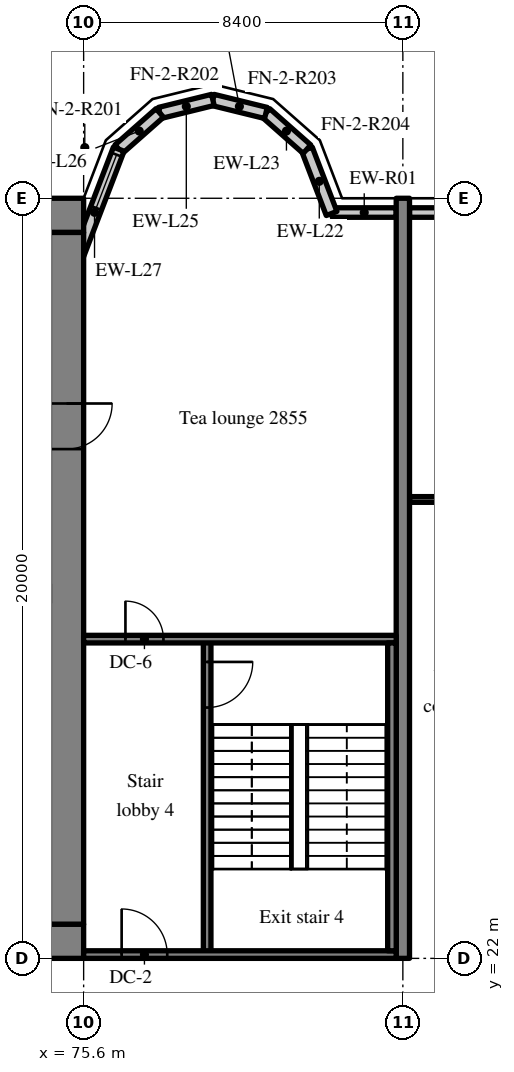
"""IFC4 building model, lengths in metres.
Left out: names, types, materials, properties, quantities, classifications, styles, units other than length and angle.
Written with IfcOpenShell. Run it as: python <this file> out.ifc"""

import sys

from ifc_helpers import new_model, si_unit, direction, frame, frame_2d, origin, place, context, subcontext, project, spatial, rectangle, extrude, source, transform, mapped, element, fill, save


model = new_model("IFC4")
c1 = context("Model", 3, precision=1e-05, world=origin(), true_north=direction((0.0, 1.0)))
c2 = subcontext(c1, "Body", "Model", "MODEL_VIEW")
j1 = project(units=[si_unit("LENGTHUNIT", "METRE"), si_unit("PLANEANGLEUNIT", "RADIAN")], contexts=[c1])
p1 = place(None, origin())
s1 = spatial("IfcSite", under=j1, at=p1, CompositionType="ELEMENT")
p2 = place(p1, origin())
s2 = spatial("IfcBuilding", under=s1, at=p2, CompositionType="ELEMENT")
p3 = place(p2, frame((0.0, 0.0, 118.0)))
s3 = spatial("IfcBuildingStorey", under=s2, at=p3, CompositionType="ELEMENT", Elevation=118.0)
m1 = source(origin(), c2, "Body", "SweptSolid", [
    extrude(rectangle(XDim=50.4, YDim=0.9, at=frame_2d((25.2, 0.0))), origin(), (0.0, 0.0, 1.0), 3.52),
])
p4 = place(p3, frame((25.2, 22.45, 0.0), z_axis=(0.0, 0.0, 1.0), x_axis=(1.0, 0.0, 0.0)))
e1 = element("IfcWall", 1, at=p4, inside=s3, PredefinedType="SHEAR", context=c2, shape_type="MappedRepresentation", body=[
    mapped(m1, transform((0.0, 0.0, 0.0), scale=1.0)),
])
m2 = source(origin(), c2, "Body", "SweptSolid", [
    extrude(rectangle(XDim=1.8, YDim=2.1, at=frame_2d((0.9, 1.05))), frame((0.0, 0.46, 0.0), z_axis=(0.0, -1.0, 0.0), x_axis=(1.0, 0.0, 0.0)), (0.0, 0.0, 1.0), 0.92),
])
p5 = place(p4, frame((15.9, 0.0, 0.0)))
e2 = element("IfcOpeningElement", 2, at=p5, cuts=e1, PredefinedType="OPENING", context=c2, shape_type="MappedRepresentation", body=[
    mapped(m2, transform((0.0, 0.0, 0.0), scale=1.0)),
])
m3 = source(origin(), c2, "Body", "SweptSolid", [
    extrude(rectangle(XDim=1.2, YDim=2.1, at=frame_2d((0.6, 1.05))), frame((0.0, 0.46, 0.0), z_axis=(0.0, -1.0, 0.0), x_axis=(1.0, 0.0, 0.0)), (0.0, 0.0, 1.0), 0.92),
])
p6 = place(p4, frame((26.975, 0.0, 0.0)))
e3 = element("IfcOpeningElement", 3, at=p6, cuts=e1, PredefinedType="OPENING", context=c2, shape_type="MappedRepresentation", body=[
    mapped(m3, transform((0.0, 0.0, 0.0), scale=1.0)),
])
m4 = source(origin(), c2, "Body", "SweptSolid", [
    extrude(rectangle(XDim=0.9, YDim=2.1, at=frame_2d((0.45, 1.05))), frame((0.0, 0.46, 0.0), z_axis=(0.0, -1.0, 0.0), x_axis=(1.0, 0.0, 0.0)), (0.0, 0.0, 1.0), 0.92),
])
p7 = place(p4, frame((33.75, 0.0, 0.0)))
e4 = element("IfcOpeningElement", 4, at=p7, cuts=e1, PredefinedType="OPENING", context=c2, shape_type="MappedRepresentation", body=[
    mapped(m4, transform((0.0, 0.0, 0.0), scale=1.0)),
])
p8 = place(p4, frame((30.75, 0.0, 0.0)))
e5 = element("IfcOpeningElement", 5, at=p8, cuts=e1, PredefinedType="OPENING", context=c2, shape_type="MappedRepresentation", body=[
    mapped(m4, transform((0.0, 0.0, 0.0), scale=1.0)),
])
p9 = place(p4, frame((39.788, 0.0, 0.0)))
e6 = element("IfcOpeningElement", 6, at=p9, cuts=e1, PredefinedType="OPENING", context=c2, shape_type="MappedRepresentation", body=[
    mapped(m4, transform((0.0, 0.0, 0.0), scale=1.0)),
])
p10 = place(p4, frame((36.762, 0.0, 0.0)))
e7 = element("IfcOpeningElement", 7, at=p10, cuts=e1, PredefinedType="OPENING", context=c2, shape_type="MappedRepresentation", body=[
    mapped(m4, transform((0.0, 0.0, 0.0), scale=1.0)),
])
p11 = place(p4, frame((6.45, 0.0, 0.0)))
e8 = element("IfcOpeningElement", 8, at=p11, cuts=e1, PredefinedType="OPENING", context=c2, shape_type="MappedRepresentation", body=[
    mapped(m3, transform((0.0, 0.0, 0.0), scale=1.0)),
])
p12 = place(p4, frame((47.775, 0.0, 0.0)))
e9 = element("IfcOpeningElement", 9, at=p12, cuts=e1, PredefinedType="OPENING", context=c2, shape_type="MappedRepresentation", body=[
    mapped(m3, transform((0.0, 0.0, 0.0), scale=1.0)),
])
p13 = place(p3, frame((25.2, 41.55, 0.0), z_axis=(0.0, 0.0, 1.0), x_axis=(1.0, 0.0, 0.0)))
e10 = element("IfcWall", 10, at=p13, inside=s3, PredefinedType="SHEAR", context=c2, shape_type="MappedRepresentation", body=[
    mapped(m1, transform((0.0, 0.0, 0.0), scale=1.0)),
])
m5 = source(origin(), c2, "Body", "SweptSolid", [
    extrude(rectangle(XDim=18.2, YDim=0.9, at=frame_2d((9.1, 0.0))), origin(), (0.0, 0.0, 1.0), 3.52),
])
p14 = place(p3, frame((75.15, 22.9, 0.0), z_axis=(0.0, 0.0, 1.0), x_axis=(0.0, 1.0, 0.0)))
e11 = element("IfcWall", 11, at=p14, inside=s3, PredefinedType="SHEAR", context=c2, shape_type="MappedRepresentation", body=[
    mapped(m5, transform((0.0, 0.0, 0.0), scale=1.0)),
])
p15 = place(p14, frame((12.5, 0.0, 0.0)))
e12 = element("IfcOpeningElement", 12, at=p15, cuts=e11, PredefinedType="OPENING", context=c2, shape_type="MappedRepresentation", body=[
    mapped(m3, transform((0.0, 0.0, 0.0), scale=1.0)),
])
m6 = source(origin(), c2, "Body", "SweptSolid", [
    extrude(rectangle(XDim=20.0, YDim=0.35, at=frame_2d((10.0, 0.0))), origin(), (0.0, 0.0, 1.0), 3.52),
])
p16 = place(p3, frame((84.0, 22.0, 0.0), z_axis=(0.0, 0.0, 1.0), x_axis=(0.0, 1.0, 0.0)))
e13 = element("IfcWall", 13, at=p16, inside=s3, PredefinedType="SHEAR", context=c2, shape_type="MappedRepresentation", body=[
    mapped(m6, transform((0.0, 0.0, 0.0), scale=1.0)),
])
m7 = source(origin(), c2, "Body", "SweptSolid", [
    extrude(rectangle(XDim=1.683, YDim=0.25, at=frame_2d((0.841, 0.0))), origin(), (0.0, 0.0, 1.0), 2.82),
])
p17 = place(p3, frame((83.825, 41.625, 0.0), z_axis=(0.0, 0.0, 1.0), x_axis=(-1.0, 0.0, 0.0)))
e14 = element("IfcWall", 14, at=p17, inside=s3, PredefinedType="SOLIDWALL", context=c2, shape_type="MappedRepresentation", body=[
    mapped(m7, transform((0.0, 0.0, 0.0), scale=1.0)),
])
m8 = source(origin(), c2, "Body", "SweptSolid", [
    extrude(rectangle(XDim=3.675, YDim=0.25, at=frame_2d((1.837, 0.0))), origin(), (0.0, 0.0, 1.0), 2.82),
])
p18 = place(p3, frame((87.85, 41.625, 0.0), z_axis=(0.0, 0.0, 1.0), x_axis=(-1.0, 0.0, 0.0)))
e15 = element("IfcWall", 15, at=p18, inside=s3, PredefinedType="SOLIDWALL", context=c2, shape_type="MappedRepresentation", body=[
    mapped(m8, transform((0.0, 0.0, 0.0), scale=1.0)),
])
m9 = source(origin(), c2, "Body", "SweptSolid", [
    extrude(rectangle(XDim=1.5, YDim=1.5, at=frame_2d((0.75, 0.75))), frame((0.0, 0.135, 0.0), z_axis=(0.0, -1.0, 0.0), x_axis=(1.0, 0.0, 0.0)), (0.0, 0.0, 1.0), 0.27),
])
p19 = place(p18, frame((1.087, 0.0, 0.9)))
e16 = element("IfcOpeningElement", 16, at=p19, cuts=e15, PredefinedType="OPENING", context=c2, shape_type="MappedRepresentation", body=[
    mapped(m9, transform((0.0, 0.0, 0.0), scale=1.0)),
])
m10 = source(origin(), c2, "Body", "SweptSolid", [
    extrude(rectangle(XDim=1.812, YDim=0.3, at=frame_2d((0.906, 0.0))), origin(), (0.0, 0.0, 1.0), 3.52),
])
p20 = place(p3, frame((82.125, 41.6, 0.0), z_axis=(0.0, 0.0, 1.0), x_axis=(-0.357877270961, 0.93376863244, 0.0)))
e17 = element("IfcWall", 17, at=p20, inside=s3, PredefinedType="SOLIDWALL", context=c2, shape_type="MappedRepresentation", body=[
    mapped(m10, transform((0.0, 0.0, 0.0), scale=1.0)),
])
m11 = source(origin(), c2, "Body", "SweptSolid", [
    extrude(rectangle(XDim=1.44, YDim=0.3, at=frame_2d((0.72, 0.0))), origin(), (0.0, 0.0, 1.0), 3.52),
])
p21 = place(p3, frame((81.477, 43.292, 0.0), z_axis=(0.0, 0.0, 1.0), x_axis=(-0.74957555648, 0.661918790432, 0.0)))
e18 = element("IfcWall", 18, at=p21, inside=s3, PredefinedType="SOLIDWALL", context=c2, shape_type="MappedRepresentation", body=[
    mapped(m11, transform((0.0, 0.0, 0.0), scale=1.0)),
])
m12 = source(origin(), c2, "Body", "SweptSolid", [
    extrude(rectangle(XDim=1.439, YDim=0.3, at=frame_2d((0.719, 0.0))), origin(), (0.0, 0.0, 1.0), 3.52),
])
for number, where, z_axis, x_axis in (
    (19, (80.397, 44.245, 0.0), (0.0, 0.0, 1.0), (-0.971, 0.238, 0.0)),
    (20, (79.0, 44.588, 0.0), (0.0, 0.0, 1.0), (-0.971, -0.238, 0.0)),
):
    element("IfcWall", number, at=place(p3, frame(where, z_axis=z_axis, x_axis=x_axis)), inside=s3, PredefinedType="SOLIDWALL", context=c2, shape_type="MappedRepresentation", body=[
        mapped(m12, transform((0.0, 0.0, 0.0), scale=1.0)),
    ])
p22 = place(p3, frame((77.603, 44.245, 0.0), z_axis=(0.0, 0.0, 1.0), x_axis=(-0.74957555648, -0.661918790432, 0.0)))
e21 = element("IfcWall", 21, at=p22, inside=s3, PredefinedType="SOLIDWALL", context=c2, shape_type="MappedRepresentation", body=[
    mapped(m11, transform((0.0, 0.0, 0.0), scale=1.0)),
])
m13 = source(origin(), c2, "Body", "SweptSolid", [
    extrude(rectangle(XDim=3.559, YDim=0.3, at=frame_2d((1.78, 0.0))), origin(), (0.0, 0.0, 1.0), 3.52),
])
p23 = place(p3, frame((76.523, 43.292, 0.0), z_axis=(0.0, 0.0, 1.0), x_axis=(-0.35779745313, -0.933799219604, 0.0)))
e22 = element("IfcWall", 22, at=p23, inside=s3, PredefinedType="SOLIDWALL", context=c2, shape_type="MappedRepresentation", body=[
    mapped(m13, transform((0.0, 0.0, 0.0), scale=1.0)),
])
m14 = source(origin(), c2, "Body", "SweptSolid", [
    extrude(rectangle(XDim=1.5, YDim=2.0, at=frame_2d((0.75, 1.0))), frame((0.0, 0.16, 0.0), z_axis=(0.0, -1.0, 0.0), x_axis=(1.0, 0.0, 0.0)), (0.0, 0.0, 1.0), 0.32),
])
p24 = place(p23, frame((0.156, 0.0, 0.9)))
e23 = element("IfcOpeningElement", 23, at=p24, cuts=e22, PredefinedType="OPENING", context=c2, shape_type="MappedRepresentation", body=[
    mapped(m14, transform((0.0, 0.0, 0.0), scale=1.0)),
])
m15 = source(origin(), c2, "Body", "SweptSolid", [
    extrude(rectangle(XDim=8.3, YDim=0.2, at=frame_2d((4.15, 0.0))), origin(), (0.0, 0.0, 1.0), 3.52),
])
p25 = place(p3, frame((78.85, 22.1, 0.0), z_axis=(0.0, 0.0, 1.0), x_axis=(0.0, 1.0, 0.0)))
e24 = element("IfcWall", 24, at=p25, inside=s3, PredefinedType="SOLIDWALL", context=c2, shape_type="MappedRepresentation", body=[
    mapped(m15, transform((0.0, 0.0, 0.0), scale=1.0)),
])
m16 = source(origin(), c2, "Body", "SweptSolid", [
    extrude(rectangle(XDim=1.2, YDim=2.1, at=frame_2d((0.6, 1.05))), frame((0.0, 0.11, 0.0), z_axis=(0.0, -1.0, 0.0), x_axis=(1.0, 0.0, 0.0)), (0.0, 0.0, 1.0), 0.22),
])
p26 = place(p25, frame((6.5, 0.0, 0.0)))
e25 = element("IfcOpeningElement", 25, at=p26, cuts=e24, PredefinedType="OPENING", context=c2, shape_type="MappedRepresentation", body=[
    mapped(m16, transform((0.0, 0.0, 0.0), scale=1.0)),
])
m17 = source(origin(), c2, "Body", "SweptSolid", [
    extrude(rectangle(XDim=8.225, YDim=0.2, at=frame_2d((4.112, 0.0))), origin(), (0.0, 0.0, 1.0), 3.52),
])
p27 = place(p3, frame((83.825, 22.1, 0.0), z_axis=(0.0, 0.0, 1.0), x_axis=(-1.0, 0.0, 0.0)))
e26 = element("IfcWall", 26, at=p27, inside=s3, PredefinedType="SOLIDWALL", context=c2, shape_type="MappedRepresentation", body=[
    mapped(m17, transform((0.0, 0.0, 0.0), scale=1.0)),
])
p28 = place(p27, frame((6.025, 0.0, 0.0)))
e27 = element("IfcOpeningElement", 27, at=p28, cuts=e26, PredefinedType="OPENING", context=c2, shape_type="MappedRepresentation", body=[
    mapped(m16, transform((0.0, 0.0, 0.0), scale=1.0)),
])
p29 = place(p3, frame((83.825, 30.4, 0.0), z_axis=(0.0, 0.0, 1.0), x_axis=(-1.0, 0.0, 0.0)))
e28 = element("IfcWall", 28, at=p29, inside=s3, PredefinedType="SOLIDWALL", context=c2, shape_type="MappedRepresentation", body=[
    mapped(m17, transform((0.0, 0.0, 0.0), scale=1.0)),
])
m18 = source(origin(), c2, "Body", "SweptSolid", [
    extrude(rectangle(XDim=1.0, YDim=2.1, at=frame_2d((0.5, 1.05))), frame((0.0, 0.11, 0.0), z_axis=(0.0, -1.0, 0.0), x_axis=(1.0, 0.0, 0.0)), (0.0, 0.0, 1.0), 0.22),
])
p30 = place(p29, frame((6.125, 0.0, 0.0)))
e29 = element("IfcOpeningElement", 29, at=p30, cuts=e28, PredefinedType="OPENING", context=c2, shape_type="MappedRepresentation", body=[
    mapped(m18, transform((0.0, 0.0, 0.0), scale=1.0)),
])
m19 = source(origin(), c2, "Body", "SweptSolid", [
    extrude(rectangle(XDim=8.1, YDim=0.225, at=frame_2d((4.05, 0.0))), origin(), (0.0, 0.0, 1.0), 3.52),
])
p31 = place(p3, frame((83.713, 22.2, 0.0), z_axis=(0.0, 0.0, 1.0), x_axis=(0.0, 1.0, 0.0)))
e30 = element("IfcWall", 30, at=p31, inside=s3, PredefinedType="SOLIDWALL", context=c2, shape_type="MappedRepresentation", body=[
    mapped(m19, transform((0.0, 0.0, 0.0), scale=1.0)),
])
m20 = source(origin(), c2, "Body", "SweptSolid", [
    extrude(rectangle(XDim=8.05, YDim=0.15, at=frame_2d((4.025, 0.0))), origin(), (0.0, 0.0, 1.0), 3.52),
])
p32 = place(p3, frame((84.175, 34.075, 0.0), z_axis=(0.0, 0.0, 1.0), x_axis=(1.0, 0.0, 0.0)))
e31 = element("IfcWall", 31, at=p32, inside=s3, PredefinedType="PARTITIONING", context=c2, shape_type="MappedRepresentation", body=[
    mapped(m20, transform((0.0, 0.0, 0.0), scale=1.0)),
])
m21 = source(origin(), c2, "Body", "SweptSolid", [
    extrude(rectangle(XDim=1.0, YDim=2.1, at=frame_2d((0.5, 1.05))), frame((0.0, 0.085, 0.0), z_axis=(0.0, -1.0, 0.0), x_axis=(1.0, 0.0, 0.0)), (0.0, 0.0, 1.0), 0.17),
])
p33 = place(p32, frame((0.7, 0.0, 0.0)))
e32 = element("IfcOpeningElement", 32, at=p33, cuts=e31, PredefinedType="OPENING", context=c2, shape_type="MappedRepresentation", body=[
    mapped(m21, transform((0.0, 0.0, 0.0), scale=1.0)),
])
m22 = source(origin(), c2, "Body", "SweptSolid", [
    extrude(rectangle(XDim=1.5, YDim=2.0, at=frame_2d((0.75, 1.0))), frame((0.0, 0.03, 0.0), z_axis=(0.0, -1.0, 0.0), x_axis=(1.0, 0.0, 0.0)), (0.0, 0.0, 1.0), 0.06),
])
p34 = place(p24, origin())
e33 = element("IfcWindow", 33, at=p34, inside=s3, PartitioningType="SINGLE_PANEL", PredefinedType="WINDOW", context=c2, shape_type="MappedRepresentation", body=[
    mapped(m22, transform((0.0, 0.0, 0.0), scale=1.0)),
])
fill(e23, e33)
m23 = source(origin(), c2, "Body", "SweptSolid", [
    extrude(rectangle(XDim=1.2, YDim=2.1, at=frame_2d((0.6, 1.05))), frame((0.0, 0.025, 0.0), z_axis=(0.0, -1.0, 0.0), x_axis=(1.0, 0.0, 0.0)), (0.0, 0.0, 1.0), 0.05),
])
p35 = place(p15, origin())
e34 = element("IfcDoor", 34, at=p35, inside=s3, OperationType="SINGLE_SWING_RIGHT", PredefinedType="DOOR", context=c2, shape_type="MappedRepresentation", body=[
    mapped(m23, transform((0.0, 0.0, 0.0), scale=1.0)),
])
fill(e12, e34)
p36 = place(p26, origin())
e35 = element("IfcDoor", 35, at=p36, inside=s3, OperationType="SINGLE_SWING_RIGHT", PredefinedType="DOOR", context=c2, shape_type="MappedRepresentation", body=[
    mapped(m23, transform((0.0, 0.0, 0.0), scale=1.0)),
])
fill(e25, e35)
p37 = place(p28, origin())
e36 = element("IfcDoor", 36, at=p37, inside=s3, OperationType="SINGLE_SWING_RIGHT", PredefinedType="DOOR", context=c2, shape_type="MappedRepresentation", body=[
    mapped(m23, transform((0.0, 0.0, 0.0), scale=1.0)),
])
fill(e27, e36)
m24 = source(origin(), c2, "Body", "SweptSolid", [
    extrude(rectangle(XDim=1.0, YDim=2.1, at=frame_2d((0.5, 1.05))), frame((0.0, 0.025, 0.0), z_axis=(0.0, -1.0, 0.0), x_axis=(1.0, 0.0, 0.0)), (0.0, 0.0, 1.0), 0.05),
])
p38 = place(p30, origin())
e37 = element("IfcDoor", 37, at=p38, inside=s3, OperationType="SINGLE_SWING_RIGHT", PredefinedType="DOOR", context=c2, shape_type="MappedRepresentation", body=[
    mapped(m24, transform((0.0, 0.0, 0.0), scale=1.0)),
])
fill(e29, e37)
save(model, sys.argv[1])
